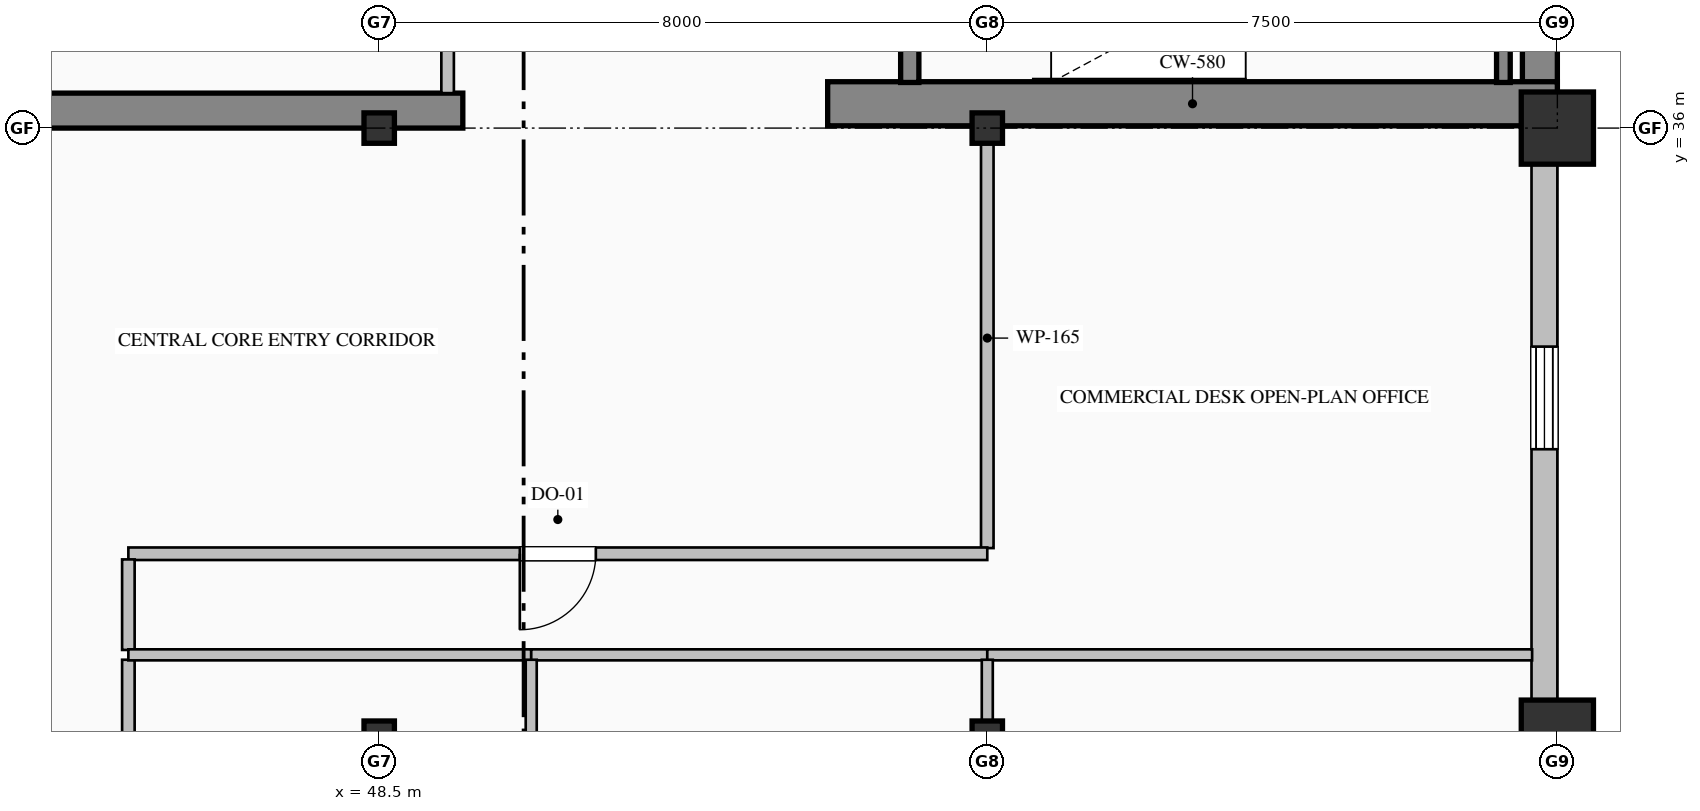
"""IFC4 building model, lengths in metres.
Left out: names, types, materials, properties, quantities, classifications, styles, units other than length and angle.
Written with IfcOpenShell. Run it as: python <this file> out.ifc"""

import sys

from ifc_helpers import new_model, si_unit, direction, frame, frame_2d, origin, origin_2d, place, context, subcontext, project, spatial, rectangle, hollow_rectangle, i_section, extrude, element, fill, save


model = new_model("IFC4")
c1 = context("Model", 3, precision=1e-05, world=origin(), true_north=direction((0.0, 1.0)))
c2 = subcontext(c1, "Body", "Model", "MODEL_VIEW")
j1 = project(units=[si_unit("LENGTHUNIT", "METRE"), si_unit("PLANEANGLEUNIT", "RADIAN")], contexts=[c1])
p1 = place(None, origin())
s1 = spatial("IfcSite", under=j1, at=p1, CompositionType="ELEMENT")
p2 = place(p1, origin())
s2 = spatial("IfcBuilding", under=s1, at=p2, CompositionType="ELEMENT")
p3 = place(p2, frame((0.0, 0.0, 265.8)))
s3 = spatial("IfcBuildingStorey", under=s2, at=p3, CompositionType="ELEMENT", Elevation=265.8)
p4 = place(p3, frame((63.77, 36.32, 0.0), z_axis=(0.0, 0.0, 1.0), x_axis=(0.0, 1.0, 0.0)))
e1 = element("IfcWall", 1, at=p4, inside=s3, PredefinedType="SHEAR", context=c2, shape_type="SweptSolid", body=[
    extrude(rectangle(XDim=15.22, YDim=0.46, at=frame_2d((7.61, 0.0))), origin(), (0.0, 0.0, 1.0), 3.775),
])
p5 = place(p3, frame((40.5, 36.23, 0.0), z_axis=(0.0, 0.0, 1.0), x_axis=(1.0, 0.0, 0.0)))
e2 = element("IfcWall", 2, at=p5, inside=s3, PredefinedType="SHEAR", context=c2, shape_type="SweptSolid", body=[
    extrude(rectangle(XDim=9.1, YDim=0.46, at=frame_2d((4.55, 0.0))), origin(), (0.0, 0.0, 1.0), 3.775),
])
p6 = place(p3, frame((54.4, 36.32, 0.0), z_axis=(0.0, 0.0, 1.0), x_axis=(1.0, 0.0, 0.0)))
e3 = element("IfcWall", 3, at=p6, inside=s3, PredefinedType="SHEAR", context=c2, shape_type="SweptSolid", body=[
    extrude(rectangle(XDim=9.6, YDim=0.58, at=frame_2d((4.8, 0.0))), origin(), (0.0, 0.0, 1.0), 4.0),
])
for number, where, z_axis, x_axis in (
    (4, (48.5, 28.0, 0.0), (0.0, 0.0, 1.0), (1.0, 0.0, 0.0)),
    (5, (48.5, 36.0, 0.0), (0.0, 0.0, 1.0), (1.0, 0.0, 0.0)),
    (6, (56.5, 28.0, 0.0), (0.0, 0.0, 1.0), (1.0, 0.0, 0.0)),
    (7, (56.5, 36.0, 0.0), (0.0, 0.0, 1.0), (1.0, 0.0, 0.0)),
):
    element("IfcColumn", number, at=place(p3, frame(where, z_axis=z_axis, x_axis=x_axis)), inside=s3, PredefinedType="COLUMN", context=c2, shape_type="SweptSolid", body=[
        extrude(i_section(OverallWidth=0.4, OverallDepth=0.4, WebThickness=0.013, FlangeThickness=0.021, FilletRadius=0.022, at=origin_2d()), origin(), (0.0, 0.0, 1.0), 4.0),
    ])
for number, where, z_axis, x_axis in (
    (8, (64.0, 28.0, 0.0), (0.0, 0.0, 1.0), (1.0, 0.0, 0.0)),
    (9, (64.0, 36.0, 0.0), (0.0, 0.0, 1.0), (1.0, 0.0, 0.0)),
):
    element("IfcColumn", number, at=place(p3, frame(where, z_axis=z_axis, x_axis=x_axis)), inside=s3, PredefinedType="COLUMN", context=c2, shape_type="SweptSolid", body=[
        extrude(hollow_rectangle(XDim=0.95, YDim=0.95, WallThickness=0.036, at=origin_2d()), origin(), (0.0, 0.0, 1.0), 4.0),
    ])
p7 = place(p3, frame((63.83, 36.05, 0.0), z_axis=(0.0, 0.0, 1.0), x_axis=(0.0, -1.0, 0.0)))
e10 = element("IfcWall", 10, at=p7, inside=s3, PredefinedType="SOLIDWALL", context=c2, shape_type="SweptSolid", body=[
    extrude(rectangle(XDim=19.55, YDim=0.34, at=frame_2d((9.775, 0.0))), origin(), (0.0, 0.0, 1.0), 3.325),
])
p8 = place(p7, frame((2.925, 0.0, 0.9)))
e11 = element("IfcOpeningElement", 11, at=p8, cuts=e10, PredefinedType="OPENING", context=c2, shape_type="SweptSolid", body=[
    extrude(rectangle(XDim=1.35, YDim=1.85, at=frame_2d((0.675, 0.925))), frame((0.0, 0.18, 0.0), z_axis=(0.0, -1.0, 0.0), x_axis=(1.0, 0.0, 0.0)), (0.0, 0.0, 1.0), 0.36),
])
p9 = place(p7, frame((10.2, 0.0, 0.9)))
e12 = element("IfcOpeningElement", 12, at=p9, cuts=e10, PredefinedType="OPENING", context=c2, shape_type="SweptSolid", body=[
    extrude(rectangle(XDim=1.2, YDim=1.85, at=frame_2d((0.6, 0.925))), frame((0.0, 0.18, 0.0), z_axis=(0.0, -1.0, 0.0), x_axis=(1.0, 0.0, 0.0)), (0.0, 0.0, 1.0), 0.36),
])
p10 = place(p7, frame((13.725, 0.0, 0.9)))
e13 = element("IfcOpeningElement", 13, at=p10, cuts=e10, PredefinedType="OPENING", context=c2, shape_type="SweptSolid", body=[
    extrude(rectangle(XDim=1.35, YDim=1.85, at=frame_2d((0.675, 0.925))), frame((0.0, 0.18, 0.0), z_axis=(0.0, -1.0, 0.0), x_axis=(1.0, 0.0, 0.0)), (0.0, 0.0, 1.0), 0.36),
])
p11 = place(p3, frame((55.48, 39.75, 0.0), z_axis=(0.0, 0.0, 1.0), x_axis=(0.0, -1.0, 0.0)))
e14 = element("IfcWall", 14, at=p11, inside=s3, PredefinedType="SOLIDWALL", context=c2, shape_type="SweptSolid", body=[
    extrude(rectangle(XDim=3.15, YDim=0.24, at=frame_2d((1.575, 0.0))), origin(), (0.0, 0.0, 1.0), 4.0),
])
p12 = place(p11, frame((1.0, 0.0, 0.0)))
e15 = element("IfcOpeningElement", 15, at=p12, cuts=e14, PredefinedType="OPENING", context=c2, shape_type="SweptSolid", body=[
    extrude(rectangle(XDim=1.15, YDim=2.2, at=frame_2d((0.575, 1.1))), frame((0.0, 0.13, 0.0), z_axis=(0.0, -1.0, 0.0), x_axis=(1.0, 0.0, 0.0)), (0.0, 0.0, 1.0), 0.26),
])
p13 = place(p3, frame((63.29, 36.6, 0.0), z_axis=(0.0, 0.0, 1.0), x_axis=(0.0, 1.0, 0.0)))
e16 = element("IfcWall", 16, at=p13, inside=s3, PredefinedType="SOLIDWALL", context=c2, shape_type="SweptSolid", body=[
    extrude(rectangle(XDim=3.15, YDim=0.18, at=frame_2d((1.575, 0.0))), origin(), (0.0, 0.0, 1.0), 4.0),
])
p14 = place(p3, frame((49.4, 36.46, 0.0), z_axis=(0.0, 0.0, 1.0), x_axis=(0.0, 1.0, 0.0)))
e17 = element("IfcWall", 17, at=p14, inside=s3, PredefinedType="PARTITIONING", context=c2, shape_type="SweptSolid", body=[
    extrude(rectangle(XDim=7.69, YDim=0.165, at=frame_2d((3.845, 0.0))), origin(), (0.0, 0.0, 1.0), 3.017),
])
p15 = place(p14, frame((3.345, 0.0, 0.0)))
e18 = element("IfcOpeningElement", 18, at=p15, cuts=e17, PredefinedType="OPENING", context=c2, shape_type="SweptSolid", body=[
    extrude(rectangle(XDim=1.0, YDim=2.15, at=frame_2d((0.5, 1.075))), frame((0.0, 0.093, 0.0), z_axis=(0.0, -1.0, 0.0), x_axis=(1.0, 0.0, 0.0)), (0.0, 0.0, 1.0), 0.185),
])
p16 = place(p3, frame((56.5, 36.0, 0.0), z_axis=(0.0, 0.0, 1.0), x_axis=(0.0, -1.0, 0.0)))
e19 = element("IfcWall", 19, at=p16, inside=s3, PredefinedType="PARTITIONING", context=c2, shape_type="SweptSolid", body=[
    extrude(rectangle(XDim=5.525, YDim=0.165, at=frame_2d((2.763, 0.0))), origin(), (0.0, 0.0, 1.0), 3.179),
])
p17 = place(p3, frame((56.5, 30.4, 0.0), z_axis=(0.0, 0.0, 1.0), x_axis=(-1.0, 0.0, 0.0)))
e20 = element("IfcWall", 20, at=p17, inside=s3, PredefinedType="PARTITIONING", context=c2, shape_type="SweptSolid", body=[
    extrude(rectangle(XDim=11.3, YDim=0.165, at=frame_2d((5.65, 0.0))), origin(), (0.0, 0.0, 1.0), 3.775),
])
p18 = place(p17, frame((5.15, 0.0, 0.0)))
e21 = element("IfcOpeningElement", 21, at=p18, cuts=e20, PredefinedType="OPENING", context=c2, shape_type="SweptSolid", body=[
    extrude(rectangle(XDim=1.0, YDim=2.15, at=frame_2d((0.5, 1.075))), frame((0.0, 0.093, 0.0), z_axis=(0.0, -1.0, 0.0), x_axis=(1.0, 0.0, 0.0)), (0.0, 0.0, 1.0), 0.185),
])
p19 = place(p3, frame((45.2, 30.325, 0.0), z_axis=(0.0, 0.0, 1.0), x_axis=(0.0, -1.0, 0.0)))
e22 = element("IfcWall", 22, at=p19, inside=s3, PredefinedType="PARTITIONING", context=c2, shape_type="SweptSolid", body=[
    extrude(rectangle(XDim=1.191, YDim=0.165, at=frame_2d((0.595, 0.0))), origin(), (0.0, 0.0, 1.0), 3.775),
])
p20 = place(p3, frame((45.2, 29.006, 0.0), z_axis=(0.0, 0.0, 1.0), x_axis=(0.0, -1.0, 0.0)))
e23 = element("IfcWall", 23, at=p20, inside=s3, PredefinedType="PARTITIONING", context=c2, shape_type="SweptSolid", body=[
    extrude(rectangle(XDim=5.531, YDim=0.165, at=frame_2d((2.766, 0.0))), origin(), (0.0, 0.0, 1.0), 3.775),
])
p21 = place(p20, frame((2.265, 0.0, 0.0)))
e24 = element("IfcOpeningElement", 24, at=p21, cuts=e23, PredefinedType="OPENING", context=c2, shape_type="SweptSolid", body=[
    extrude(rectangle(XDim=1.0, YDim=2.15, at=frame_2d((0.5, 1.075))), frame((0.0, 0.093, 0.0), z_axis=(0.0, -1.0, 0.0), x_axis=(1.0, 0.0, 0.0)), (0.0, 0.0, 1.0), 0.185),
])
p22 = place(p3, frame((50.5, 29.07, 0.0), z_axis=(0.0, 0.0, 1.0), x_axis=(-1.0, 0.0, 0.0)))
e25 = element("IfcWall", 25, at=p22, inside=s3, PredefinedType="PARTITIONING", context=c2, shape_type="SweptSolid", body=[
    extrude(rectangle(XDim=5.3, YDim=0.145, at=frame_2d((2.65, 0.0))), origin(), (0.0, 0.0, 1.0), 3.775),
])
p23 = place(p3, frame((56.5, 29.07, 0.0), z_axis=(0.0, 0.0, 1.0), x_axis=(-1.0, 0.0, 0.0)))
e26 = element("IfcWall", 26, at=p23, inside=s3, PredefinedType="PARTITIONING", context=c2, shape_type="SweptSolid", body=[
    extrude(rectangle(XDim=6.0, YDim=0.145, at=frame_2d((3.0, 0.0))), origin(), (0.0, 0.0, 1.0), 3.775),
])
p24 = place(p3, frame((63.668, 29.07, 0.0), z_axis=(0.0, 0.0, 1.0), x_axis=(-1.0, 0.0, 0.0)))
e27 = element("IfcWall", 27, at=p24, inside=s3, PredefinedType="PARTITIONING", context=c2, shape_type="SweptSolid", body=[
    extrude(rectangle(XDim=7.168, YDim=0.145, at=frame_2d((3.584, 0.0))), origin(), (0.0, 0.0, 1.0), 3.775),
])
p25 = place(p3, frame((50.5, 29.006, 0.0), z_axis=(0.0, 0.0, 1.0), x_axis=(0.0, -1.0, 0.0)))
e28 = element("IfcWall", 28, at=p25, inside=s3, PredefinedType="PARTITIONING", context=c2, shape_type="SweptSolid", body=[
    extrude(rectangle(XDim=5.531, YDim=0.145, at=frame_2d((2.766, 0.0))), origin(), (0.0, 0.0, 1.0), 3.775),
])
p26 = place(p3, frame((56.5, 29.006, 0.0), z_axis=(0.0, 0.0, 1.0), x_axis=(0.0, -1.0, 0.0)))
e29 = element("IfcWall", 29, at=p26, inside=s3, PredefinedType="PARTITIONING", context=c2, shape_type="SweptSolid", body=[
    extrude(rectangle(XDim=5.531, YDim=0.145, at=frame_2d((2.766, 0.0))), origin(), (0.0, 0.0, 1.0), 2.967),
])
p27 = place(p8, origin())
e30 = element("IfcWindow", 30, at=p27, inside=s3, PartitioningType="DOUBLE_PANEL_VERTICAL", PredefinedType="WINDOW", context=c2, shape_type="SweptSolid", body=[
    extrude(rectangle(XDim=1.35, YDim=1.85, at=frame_2d((0.675, 0.925))), frame((0.0, 0.15, 0.0), z_axis=(0.0, -1.0, 0.0), x_axis=(1.0, 0.0, 0.0)), (0.0, 0.0, 1.0), 0.06),
])
fill(e11, e30)
p28 = place(p18, origin())
e31 = element("IfcDoor", 31, at=p28, inside=s3, OperationType="SINGLE_SWING_RIGHT", PredefinedType="DOOR", context=c2, shape_type="SweptSolid", body=[
    extrude(rectangle(XDim=1.0, YDim=2.15, at=frame_2d((0.5, 1.075))), frame((0.0, 0.025, 0.0), z_axis=(0.0, -1.0, 0.0), x_axis=(1.0, 0.0, 0.0)), (0.0, 0.0, 1.0), 0.05),
])
fill(e21, e31)
save(model, sys.argv[1])
